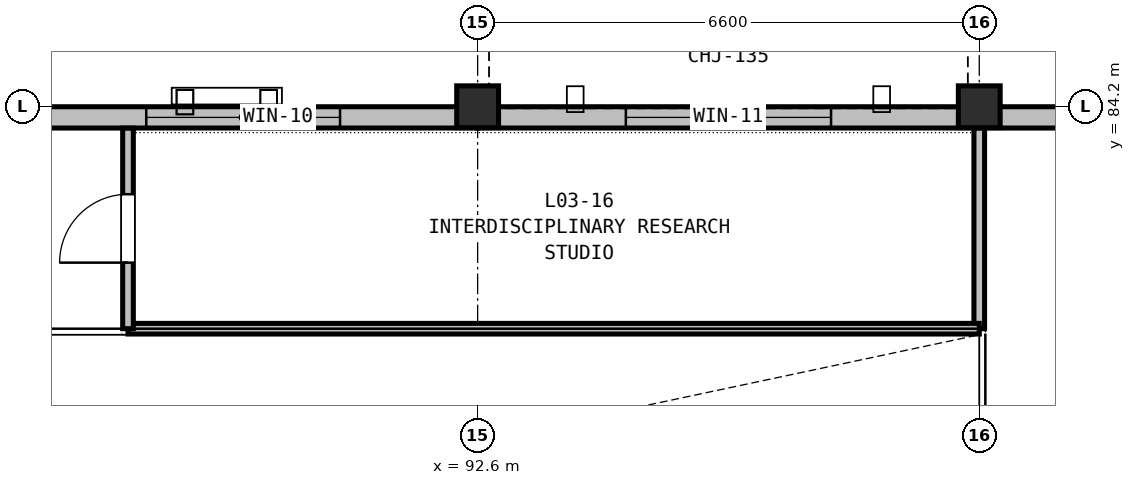
"""IFC4 building model, lengths in metres.
Left out: names, types, materials, properties, quantities, classifications, styles, units other than length and angle.
Written with IfcOpenShell. Run it as: python <this file> out.ifc"""

import sys

from ifc_helpers import new_model, si_unit, direction, frame, frame_2d, origin, origin_2d, place, context, subcontext, project, spatial, rectangle, extrude, element, fill, save


model = new_model("IFC4")
c1 = context("Model", 3, precision=1e-05, world=origin(), true_north=direction((0.0, 1.0)))
c2 = subcontext(c1, "Body", "Model", "MODEL_VIEW")
j1 = project(units=[si_unit("LENGTHUNIT", "METRE"), si_unit("PLANEANGLEUNIT", "RADIAN")], contexts=[c1])
p1 = place(None, origin())
s1 = spatial("IfcSite", under=j1, at=p1, CompositionType="ELEMENT")
p2 = place(p1, origin())
s2 = spatial("IfcBuilding", under=s1, at=p2, CompositionType="ELEMENT")
p3 = place(p2, frame((0.0, 0.0, 15.0)))
s3 = spatial("IfcBuildingStorey", under=s2, at=p3, CompositionType="ELEMENT", Elevation=15.0)
for number, where, z_axis, x_axis in (
    (1, (92.6, 84.2, 0.0), (0.0, 0.0, 1.0), (1.0, 0.0, 0.0)),
    (2, (99.2, 84.2, 0.0), (0.0, 0.0, 1.0), (1.0, 0.0, 0.0)),
):
    element("IfcColumn", number, at=place(p3, frame(where, z_axis=z_axis, x_axis=x_axis)), inside=s3, PredefinedType="COLUMN", context=c2, shape_type="SweptSolid", body=[
        extrude(rectangle(XDim=0.55, YDim=0.55, at=origin_2d()), origin(), (0.0, 0.0, 1.0), 4.44),
    ])
p4 = place(p3, frame((86.0, 84.06, 0.0), z_axis=(0.0, 0.0, 1.0), x_axis=(1.0, 0.0, 0.0)))
e3 = element("IfcWall", 3, at=p4, inside=s3, PredefinedType="STANDARD", context=c2, shape_type="SweptSolid", body=[
    extrude(rectangle(XDim=6.6, YDim=0.28, at=frame_2d((3.3, 0.0))), origin(), (0.0, 0.0, 1.0), 3.535),
])
p5 = place(p4, frame((2.24, 0.0, 0.75)))
e4 = element("IfcOpeningElement", 4, at=p5, cuts=e3, PredefinedType="OPENING", context=c2, shape_type="SweptSolid", body=[
    extrude(rectangle(XDim=2.55, YDim=2.15, at=frame_2d((1.275, 1.075))), frame((0.0, 0.15, 0.0), z_axis=(0.0, -1.0, 0.0), x_axis=(1.0, 0.0, 0.0)), (0.0, 0.0, 1.0), 0.3),
])
p6 = place(p3, frame((92.6, 84.06, 0.0), z_axis=(0.0, 0.0, 1.0), x_axis=(1.0, 0.0, 0.0)))
e5 = element("IfcWall", 5, at=p6, inside=s3, PredefinedType="STANDARD", context=c2, shape_type="SweptSolid", body=[
    extrude(rectangle(XDim=6.6, YDim=0.28, at=frame_2d((3.3, 0.0))), origin(), (0.0, 0.0, 1.0), 3.535),
])
p7 = place(p6, frame((1.95, 0.0, 0.75)))
e6 = element("IfcOpeningElement", 6, at=p7, cuts=e5, PredefinedType="OPENING", context=c2, shape_type="SweptSolid", body=[
    extrude(rectangle(XDim=2.7, YDim=2.2, at=frame_2d((1.35, 1.1))), frame((0.0, 0.15, 0.0), z_axis=(0.0, -1.0, 0.0), x_axis=(1.0, 0.0, 0.0)), (0.0, 0.0, 1.0), 0.3),
])
p8 = place(p3, frame((99.2, 84.06, 0.0), z_axis=(0.0, 0.0, 1.0), x_axis=(1.0, 0.0, 0.0)))
e7 = element("IfcWall", 7, at=p8, inside=s3, PredefinedType="STANDARD", context=c2, shape_type="SweptSolid", body=[
    extrude(rectangle(XDim=6.6, YDim=0.28, at=frame_2d((3.3, 0.0))), origin(), (0.0, 0.0, 1.0), 3.535),
])
p9 = place(p8, frame((1.85, 0.0, 0.75)))
e8 = element("IfcOpeningElement", 8, at=p9, cuts=e7, PredefinedType="OPENING", context=c2, shape_type="SweptSolid", body=[
    extrude(rectangle(XDim=2.9, YDim=2.2, at=frame_2d((1.45, 1.1))), frame((0.0, 0.15, 0.0), z_axis=(0.0, -1.0, 0.0), x_axis=(1.0, 0.0, 0.0)), (0.0, 0.0, 1.0), 0.3),
])
p10 = place(p3, frame((99.2, 83.918, 0.0), z_axis=(0.0, 0.0, 1.0), x_axis=(0.0, -1.0, 0.0)))
e9 = element("IfcWall", 9, at=p10, inside=s3, PredefinedType="PARTITIONING", context=c2, shape_type="SweptSolid", body=[
    extrude(rectangle(XDim=2.638, YDim=0.14, at=frame_2d((1.319, 0.0))), origin(), (0.0, 0.0, 1.0), 3.535),
])
p11 = place(p3, frame((99.2, 81.28, 0.0), z_axis=(0.0, 0.0, 1.0), x_axis=(-1.0, 0.0, 0.0)))
e10 = element("IfcWall", 10, at=p11, inside=s3, PredefinedType="PARTITIONING", context=c2, shape_type="SweptSolid", body=[
    extrude(rectangle(XDim=11.2, YDim=0.14, at=frame_2d((5.6, 0.0))), origin(), (0.0, 0.0, 1.0), 3.535),
])
p12 = place(p3, frame((88.0, 81.28, 0.0), z_axis=(0.0, 0.0, 1.0), x_axis=(0.0, 1.0, 0.0)))
e11 = element("IfcWall", 11, at=p12, inside=s3, PredefinedType="PARTITIONING", context=c2, shape_type="SweptSolid", body=[
    extrude(rectangle(XDim=2.638, YDim=0.14, at=frame_2d((1.319, 0.0))), origin(), (0.0, 0.0, 1.0), 3.535),
])
p13 = place(p12, frame((0.869, 0.0, 0.0)))
e12 = element("IfcOpeningElement", 12, at=p13, cuts=e11, PredefinedType="OPENING", context=c2, shape_type="SweptSolid", body=[
    extrude(rectangle(XDim=0.9, YDim=2.06, at=frame_2d((0.45, 1.03))), frame((0.0, 0.08, 0.0), z_axis=(0.0, -1.0, 0.0), x_axis=(1.0, 0.0, 0.0)), (0.0, 0.0, 1.0), 0.16),
])
p14 = place(p5, origin())
e13 = element("IfcWindow", 13, at=p14, inside=s3, PartitioningType="SINGLE_PANEL", PredefinedType="WINDOW", context=c2, shape_type="SweptSolid", body=[
    extrude(rectangle(XDim=2.55, YDim=2.15, at=frame_2d((1.275, 1.075))), frame((0.0, 0.03, 0.0), z_axis=(0.0, -1.0, 0.0), x_axis=(1.0, 0.0, 0.0)), (0.0, 0.0, 1.0), 0.06),
])
fill(e4, e13)
p15 = place(p7, origin())
e14 = element("IfcWindow", 14, at=p15, inside=s3, PartitioningType="SINGLE_PANEL", PredefinedType="WINDOW", context=c2, shape_type="SweptSolid", body=[
    extrude(rectangle(XDim=2.7, YDim=2.2, at=frame_2d((1.35, 1.1))), frame((0.0, 0.03, 0.0), z_axis=(0.0, -1.0, 0.0), x_axis=(1.0, 0.0, 0.0)), (0.0, 0.0, 1.0), 0.06),
])
fill(e6, e14)
p16 = place(p13, origin())
e15 = element("IfcDoor", 15, at=p16, inside=s3, OperationType="SINGLE_SWING_LEFT", PredefinedType="DOOR", context=c2, shape_type="SweptSolid", body=[
    extrude(rectangle(XDim=0.9, YDim=2.06, at=frame_2d((0.45, 1.03))), frame((0.0, 0.025, 0.0), z_axis=(0.0, -1.0, 0.0), x_axis=(1.0, 0.0, 0.0)), (0.0, 0.0, 1.0), 0.05),
])
fill(e12, e15)
save(model, sys.argv[1])
